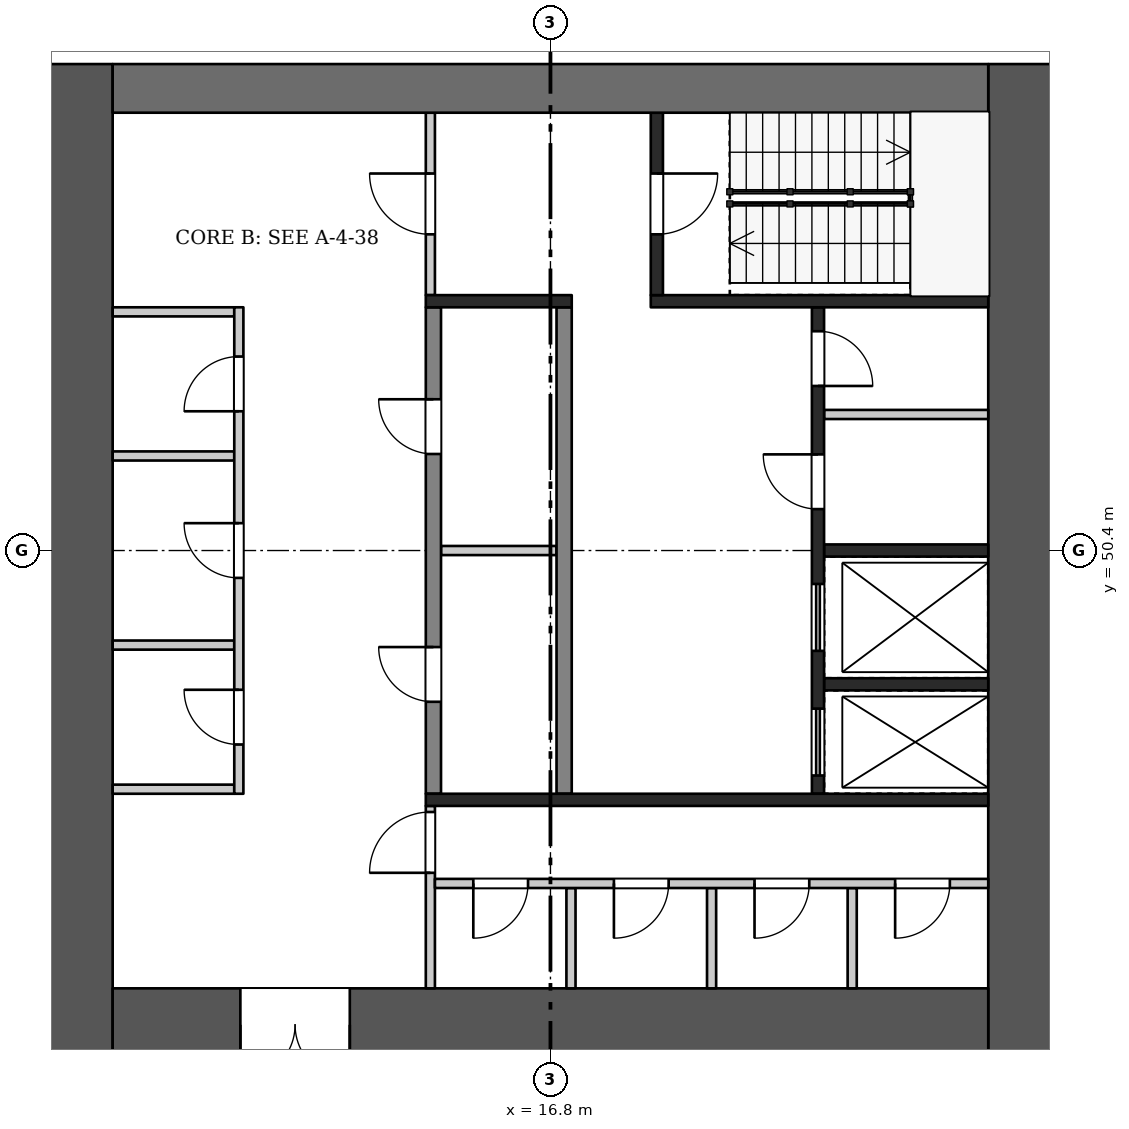
"""IFC4 building model, lengths in metres.
Left out: names, types, materials, properties, quantities, classifications, styles, units other than length and angle.
Written with IfcOpenShell. Run it as: python <this file> out.ifc"""

import sys

from ifc_helpers import new_model, si_unit, direction, frame, frame_2d, origin, place, context, subcontext, project, spatial, rectangle, extrude, element, fill, save


model = new_model("IFC4")
c1 = context("Model", 3, precision=1e-05, world=origin(), true_north=direction((0.0, 1.0)))
c2 = subcontext(c1, "Body", "Model", "MODEL_VIEW")
j1 = project(units=[si_unit("LENGTHUNIT", "METRE"), si_unit("PLANEANGLEUNIT", "RADIAN")], contexts=[c1])
p1 = place(None, origin())
s1 = spatial("IfcSite", under=j1, at=p1, CompositionType="ELEMENT")
p2 = place(p1, origin())
s2 = spatial("IfcBuilding", under=s1, at=p2, CompositionType="ELEMENT")
p3 = place(p2, frame((0.0, 0.0, -12.0)))
s3 = spatial("IfcBuildingStorey", under=s2, at=p3, CompositionType="ELEMENT", Elevation=-12.0)
for number, where, z_axis, x_axis in (
    (1, (9.0, 58.4, 0.0), (0.0, 0.0, 1.0), (0.0, -1.0, 0.0)),
    (2, (24.6, 58.4, 0.0), (0.0, 0.0, 1.0), (0.0, -1.0, 0.0)),
):
    element("IfcWall", number, at=place(p3, frame(where, z_axis=z_axis, x_axis=x_axis)), inside=s3, PredefinedType="SHEAR", context=c2, shape_type="SweptSolid", body=[
        extrude(rectangle(XDim=16.4, YDim=1.2, at=frame_2d((8.2, 0.0))), origin(), (0.0, 0.0, 1.0), 3.7),
    ])
p4 = place(p3, frame((9.6, 58.0, 0.0), z_axis=(0.0, 0.0, 1.0), x_axis=(1.0, 0.0, 0.0)))
e3 = element("IfcWall", 3, at=p4, inside=s3, PredefinedType="SHEAR", context=c2, shape_type="SweptSolid", body=[
    extrude(rectangle(XDim=14.4, YDim=0.8, at=frame_2d((7.2, 0.0))), origin(), (0.0, 0.0, 1.0), 3.7),
])
p5 = place(p3, frame((9.6, 42.6, 0.0), z_axis=(0.0, 0.0, 1.0), x_axis=(1.0, 0.0, 0.0)))
e4 = element("IfcWall", 4, at=p5, inside=s3, PredefinedType="SHEAR", context=c2, shape_type="SweptSolid", body=[
    extrude(rectangle(XDim=14.4, YDim=1.2, at=frame_2d((7.2, 0.0))), origin(), (0.0, 0.0, 1.0), 3.7),
])
p6 = place(p5, frame((2.1, 0.0, 0.0)))
e5 = element("IfcOpeningElement", 5, at=p6, cuts=e4, PredefinedType="OPENING", context=c2, shape_type="SweptSolid", body=[
    extrude(rectangle(XDim=1.8, YDim=2.1, at=frame_2d((0.9, 1.05))), frame((0.0, 0.61, 0.0), z_axis=(0.0, -1.0, 0.0), x_axis=(1.0, 0.0, 0.0)), (0.0, 0.0, 1.0), 1.22),
])
for number, where, z_axis, x_axis in (
    (6, (9.6, 54.325, 0.0), (0.0, 0.0, 1.0), (1.0, 0.0, 0.0)),
    (7, (9.6, 46.475, 0.0), (0.0, 0.0, 1.0), (1.0, 0.0, 0.0)),
    (8, (9.6, 51.955, 0.0), (0.0, 0.0, 1.0), (1.0, 0.0, 0.0)),
    (9, (9.6, 48.845, 0.0), (0.0, 0.0, 1.0), (1.0, 0.0, 0.0)),
):
    element("IfcWall", number, at=place(p3, frame(where, z_axis=z_axis, x_axis=x_axis)), inside=s3, PredefinedType="PARTITIONING", context=c2, shape_type="SweptSolid", body=[
        extrude(rectangle(XDim=2.0, YDim=0.15, at=frame_2d((1.0, 0.0))), origin(), (0.0, 0.0, 1.0), 3.7),
    ])
p7 = place(p3, frame((11.675, 54.4, 0.0), z_axis=(0.0, 0.0, 1.0), x_axis=(0.0, -1.0, 0.0)))
e10 = element("IfcWall", 10, at=p7, inside=s3, PredefinedType="PARTITIONING", context=c2, shape_type="SweptSolid", body=[
    extrude(rectangle(XDim=8.0, YDim=0.15, at=frame_2d((4.0, 0.0))), origin(), (0.0, 0.0, 1.0), 3.7),
])
p8 = place(p7, frame((0.81, 0.0, 0.0)))
e11 = element("IfcOpeningElement", 11, at=p8, cuts=e10, PredefinedType="OPENING", context=c2, shape_type="SweptSolid", body=[
    extrude(rectangle(XDim=0.9, YDim=2.1, at=frame_2d((0.45, 1.05))), frame((0.0, 0.085, 0.0), z_axis=(0.0, -1.0, 0.0), x_axis=(1.0, 0.0, 0.0)), (0.0, 0.0, 1.0), 0.17),
])
p9 = place(p7, frame((3.55, 0.0, 0.0)))
e12 = element("IfcOpeningElement", 12, at=p9, cuts=e10, PredefinedType="OPENING", context=c2, shape_type="SweptSolid", body=[
    extrude(rectangle(XDim=0.9, YDim=2.1, at=frame_2d((0.45, 1.05))), frame((0.0, 0.085, 0.0), z_axis=(0.0, -1.0, 0.0), x_axis=(1.0, 0.0, 0.0)), (0.0, 0.0, 1.0), 0.17),
])
p10 = place(p7, frame((6.29, 0.0, 0.0)))
e13 = element("IfcOpeningElement", 13, at=p10, cuts=e10, PredefinedType="OPENING", context=c2, shape_type="SweptSolid", body=[
    extrude(rectangle(XDim=0.9, YDim=2.1, at=frame_2d((0.45, 1.05))), frame((0.0, 0.085, 0.0), z_axis=(0.0, -1.0, 0.0), x_axis=(1.0, 0.0, 0.0)), (0.0, 0.0, 1.0), 0.17),
])
p11 = place(p3, frame((15.0, 50.4, 0.0), z_axis=(0.0, 0.0, 1.0), x_axis=(1.0, 0.0, 0.0)))
e14 = element("IfcWall", 14, at=p11, inside=s3, PredefinedType="PARTITIONING", context=c2, shape_type="SweptSolid", body=[
    extrude(rectangle(XDim=1.9, YDim=0.15, at=frame_2d((0.95, 0.0))), origin(), (0.0, 0.0, 1.0), 3.7),
])
p12 = place(p3, frame((14.875, 54.4, 0.0), z_axis=(0.0, 0.0, 1.0), x_axis=(0.0, -1.0, 0.0)))
e15 = element("IfcWall", 15, at=p12, inside=s3, PredefinedType="SHEAR", context=c2, shape_type="SweptSolid", body=[
    extrude(rectangle(XDim=8.0, YDim=0.25, at=frame_2d((4.0, 0.0))), origin(), (0.0, 0.0, 1.0), 3.7),
])
p13 = place(p12, frame((1.512, 0.0, 0.0)))
e16 = element("IfcOpeningElement", 16, at=p13, cuts=e15, PredefinedType="OPENING", context=c2, shape_type="SweptSolid", body=[
    extrude(rectangle(XDim=0.9, YDim=2.1, at=frame_2d((0.45, 1.05))), frame((0.0, 0.135, 0.0), z_axis=(0.0, -1.0, 0.0), x_axis=(1.0, 0.0, 0.0)), (0.0, 0.0, 1.0), 0.27),
])
p14 = place(p12, frame((5.587, 0.0, 0.0)))
e17 = element("IfcOpeningElement", 17, at=p14, cuts=e15, PredefinedType="OPENING", context=c2, shape_type="SweptSolid", body=[
    extrude(rectangle(XDim=0.9, YDim=2.1, at=frame_2d((0.45, 1.05))), frame((0.0, 0.135, 0.0), z_axis=(0.0, -1.0, 0.0), x_axis=(1.0, 0.0, 0.0)), (0.0, 0.0, 1.0), 0.27),
])
p15 = place(p3, frame((17.025, 54.4, 0.0), z_axis=(0.0, 0.0, 1.0), x_axis=(0.0, -1.0, 0.0)))
e18 = element("IfcWall", 18, at=p15, inside=s3, PredefinedType="SHEAR", context=c2, shape_type="SweptSolid", body=[
    extrude(rectangle(XDim=8.0, YDim=0.25, at=frame_2d((4.0, 0.0))), origin(), (0.0, 0.0, 1.0), 3.7),
])
for number, where, z_axis, x_axis in (
    (19, (21.3, 50.4, 0.0), (0.0, 0.0, 1.0), (1.0, 0.0, 0.0)),
    (20, (21.3, 48.2, 0.0), (0.0, 0.0, 1.0), (1.0, 0.0, 0.0)),
):
    element("IfcWall", number, at=place(p3, frame(where, z_axis=z_axis, x_axis=x_axis)), inside=s3, PredefinedType="SHEAR", context=c2, shape_type="SweptSolid", body=[
        extrude(rectangle(XDim=2.7, YDim=0.2, at=frame_2d((1.35, 0.0))), origin(), (0.0, 0.0, 1.0), 3.7),
    ])
p16 = place(p3, frame((21.3, 52.637, 0.0), z_axis=(0.0, 0.0, 1.0), x_axis=(1.0, 0.0, 0.0)))
e21 = element("IfcWall", 21, at=p16, inside=s3, PredefinedType="PARTITIONING", context=c2, shape_type="SweptSolid", body=[
    extrude(rectangle(XDim=2.7, YDim=0.15, at=frame_2d((1.35, 0.0))), origin(), (0.0, 0.0, 1.0), 3.7),
])
p17 = place(p3, frame((21.2, 54.4, 0.0), z_axis=(0.0, 0.0, 1.0), x_axis=(0.0, -1.0, 0.0)))
e22 = element("IfcWall", 22, at=p17, inside=s3, PredefinedType="SHEAR", context=c2, shape_type="SweptSolid", body=[
    extrude(rectangle(XDim=8.0, YDim=0.2, at=frame_2d((4.0, 0.0))), origin(), (0.0, 0.0, 1.0), 3.7),
])
p18 = place(p17, frame((0.394, 0.0, 0.0)))
e23 = element("IfcOpeningElement", 23, at=p18, cuts=e22, PredefinedType="OPENING", context=c2, shape_type="SweptSolid", body=[
    extrude(rectangle(XDim=0.9, YDim=2.1, at=frame_2d((0.45, 1.05))), frame((0.0, 0.11, 0.0), z_axis=(0.0, -1.0, 0.0), x_axis=(1.0, 0.0, 0.0)), (0.0, 0.0, 1.0), 0.22),
])
p19 = place(p17, frame((2.419, 0.0, 0.0)))
e24 = element("IfcOpeningElement", 24, at=p19, cuts=e22, PredefinedType="OPENING", context=c2, shape_type="SweptSolid", body=[
    extrude(rectangle(XDim=0.9, YDim=2.1, at=frame_2d((0.45, 1.05))), frame((0.0, 0.11, 0.0), z_axis=(0.0, -1.0, 0.0), x_axis=(1.0, 0.0, 0.0)), (0.0, 0.0, 1.0), 0.22),
])
p20 = place(p17, frame((4.55, 0.0, 0.0)))
e25 = element("IfcOpeningElement", 25, at=p20, cuts=e22, PredefinedType="OPENING", context=c2, shape_type="SweptSolid", body=[
    extrude(rectangle(XDim=1.1, YDim=2.1, at=frame_2d((0.55, 1.05))), frame((0.0, 0.11, 0.0), z_axis=(0.0, -1.0, 0.0), x_axis=(1.0, 0.0, 0.0)), (0.0, 0.0, 1.0), 0.22),
])
p21 = place(p17, frame((6.6, 0.0, 0.0)))
e26 = element("IfcOpeningElement", 26, at=p21, cuts=e22, PredefinedType="OPENING", context=c2, shape_type="SweptSolid", body=[
    extrude(rectangle(XDim=1.1, YDim=2.1, at=frame_2d((0.55, 1.05))), frame((0.0, 0.11, 0.0), z_axis=(0.0, -1.0, 0.0), x_axis=(1.0, 0.0, 0.0)), (0.0, 0.0, 1.0), 0.22),
])
p22 = place(p3, frame((14.75, 54.5, 0.0), z_axis=(0.0, 0.0, 1.0), x_axis=(1.0, 0.0, 0.0)))
e27 = element("IfcWall", 27, at=p22, inside=s3, PredefinedType="SHEAR", context=c2, shape_type="SweptSolid", body=[
    extrude(rectangle(XDim=2.4, YDim=0.2, at=frame_2d((1.2, 0.0))), origin(), (0.0, 0.0, 1.0), 3.7),
])
p23 = place(p3, frame((18.45, 54.5, 0.0), z_axis=(0.0, 0.0, 1.0), x_axis=(1.0, 0.0, 0.0)))
e28 = element("IfcWall", 28, at=p23, inside=s3, PredefinedType="SHEAR", context=c2, shape_type="SweptSolid", body=[
    extrude(rectangle(XDim=5.55, YDim=0.2, at=frame_2d((2.775, 0.0))), origin(), (0.0, 0.0, 1.0), 3.7),
])
p24 = place(p3, frame((14.825, 57.6, 0.0), z_axis=(0.0, 0.0, 1.0), x_axis=(0.0, -1.0, 0.0)))
e29 = element("IfcWall", 29, at=p24, inside=s3, PredefinedType="PARTITIONING", context=c2, shape_type="SweptSolid", body=[
    extrude(rectangle(XDim=3.0, YDim=0.15, at=frame_2d((1.5, 0.0))), origin(), (0.0, 0.0, 1.0), 3.7),
])
p25 = place(p24, frame((1.0, 0.0, 0.0)))
e30 = element("IfcOpeningElement", 30, at=p25, cuts=e29, PredefinedType="OPENING", context=c2, shape_type="SweptSolid", body=[
    extrude(rectangle(XDim=1.0, YDim=2.1, at=frame_2d((0.5, 1.05))), frame((0.0, 0.085, 0.0), z_axis=(0.0, -1.0, 0.0), x_axis=(1.0, 0.0, 0.0)), (0.0, 0.0, 1.0), 0.17),
])
p26 = place(p3, frame((18.55, 57.6, 0.0), z_axis=(0.0, 0.0, 1.0), x_axis=(0.0, -1.0, 0.0)))
e31 = element("IfcWall", 31, at=p26, inside=s3, PredefinedType="SHEAR", context=c2, shape_type="SweptSolid", body=[
    extrude(rectangle(XDim=3.0, YDim=0.2, at=frame_2d((1.5, 0.0))), origin(), (0.0, 0.0, 1.0), 3.7),
])
p27 = place(p26, frame((1.0, 0.0, 0.0)))
e32 = element("IfcOpeningElement", 32, at=p27, cuts=e31, PredefinedType="OPENING", context=c2, shape_type="SweptSolid", body=[
    extrude(rectangle(XDim=1.0, YDim=2.1, at=frame_2d((0.5, 1.05))), frame((0.0, 0.11, 0.0), z_axis=(0.0, -1.0, 0.0), x_axis=(1.0, 0.0, 0.0)), (0.0, 0.0, 1.0), 0.22),
])
p28 = place(p3, frame((14.75, 46.3, 0.0), z_axis=(0.0, 0.0, 1.0), x_axis=(1.0, 0.0, 0.0)))
e33 = element("IfcWall", 33, at=p28, inside=s3, PredefinedType="SHEAR", context=c2, shape_type="SweptSolid", body=[
    extrude(rectangle(XDim=9.25, YDim=0.2, at=frame_2d((4.625, 0.0))), origin(), (0.0, 0.0, 1.0), 3.7),
])
p29 = place(p3, frame((14.825, 46.2, 0.0), z_axis=(0.0, 0.0, 1.0), x_axis=(0.0, -1.0, 0.0)))
e34 = element("IfcWall", 34, at=p29, inside=s3, PredefinedType="PARTITIONING", context=c2, shape_type="SweptSolid", body=[
    extrude(rectangle(XDim=3.0, YDim=0.15, at=frame_2d((1.5, 0.0))), origin(), (0.0, 0.0, 1.0), 3.7),
])
p30 = place(p29, frame((0.1, 0.0, 0.0)))
e35 = element("IfcOpeningElement", 35, at=p30, cuts=e34, PredefinedType="OPENING", context=c2, shape_type="SweptSolid", body=[
    extrude(rectangle(XDim=1.0, YDim=2.1, at=frame_2d((0.5, 1.05))), frame((0.0, 0.085, 0.0), z_axis=(0.0, -1.0, 0.0), x_axis=(1.0, 0.0, 0.0)), (0.0, 0.0, 1.0), 0.17),
])
for number, where, z_axis, x_axis in (
    (36, (17.137, 44.85, 0.0), (0.0, 0.0, 1.0), (0.0, -1.0, 0.0)),
    (37, (19.45, 44.85, 0.0), (0.0, 0.0, 1.0), (0.0, -1.0, 0.0)),
    (38, (21.762, 44.85, 0.0), (0.0, 0.0, 1.0), (0.0, -1.0, 0.0)),
):
    element("IfcWall", number, at=place(p3, frame(where, z_axis=z_axis, x_axis=x_axis)), inside=s3, PredefinedType="PARTITIONING", context=c2, shape_type="SweptSolid", body=[
        extrude(rectangle(XDim=1.65, YDim=0.15, at=frame_2d((0.825, 0.0))), origin(), (0.0, 0.0, 1.0), 3.7),
    ])
p31 = place(p3, frame((14.9, 44.925, 0.0), z_axis=(0.0, 0.0, 1.0), x_axis=(1.0, 0.0, 0.0)))
e39 = element("IfcWall", 39, at=p31, inside=s3, PredefinedType="PARTITIONING", context=c2, shape_type="SweptSolid", body=[
    extrude(rectangle(XDim=9.1, YDim=0.15, at=frame_2d((4.55, 0.0))), origin(), (0.0, 0.0, 1.0), 3.7),
])
p32 = place(p31, frame((0.631, 0.0, 0.0)))
e40 = element("IfcOpeningElement", 40, at=p32, cuts=e39, PredefinedType="OPENING", context=c2, shape_type="SweptSolid", body=[
    extrude(rectangle(XDim=0.9, YDim=2.1, at=frame_2d((0.45, 1.05))), frame((0.0, 0.085, 0.0), z_axis=(0.0, -1.0, 0.0), x_axis=(1.0, 0.0, 0.0)), (0.0, 0.0, 1.0), 0.17),
])
p33 = place(p31, frame((2.944, 0.0, 0.0)))
e41 = element("IfcOpeningElement", 41, at=p33, cuts=e39, PredefinedType="OPENING", context=c2, shape_type="SweptSolid", body=[
    extrude(rectangle(XDim=0.9, YDim=2.1, at=frame_2d((0.45, 1.05))), frame((0.0, 0.085, 0.0), z_axis=(0.0, -1.0, 0.0), x_axis=(1.0, 0.0, 0.0)), (0.0, 0.0, 1.0), 0.17),
])
p34 = place(p31, frame((5.256, 0.0, 0.0)))
e42 = element("IfcOpeningElement", 42, at=p34, cuts=e39, PredefinedType="OPENING", context=c2, shape_type="SweptSolid", body=[
    extrude(rectangle(XDim=0.9, YDim=2.1, at=frame_2d((0.45, 1.05))), frame((0.0, 0.085, 0.0), z_axis=(0.0, -1.0, 0.0), x_axis=(1.0, 0.0, 0.0)), (0.0, 0.0, 1.0), 0.17),
])
p35 = place(p31, frame((7.569, 0.0, 0.0)))
e43 = element("IfcOpeningElement", 43, at=p35, cuts=e39, PredefinedType="OPENING", context=c2, shape_type="SweptSolid", body=[
    extrude(rectangle(XDim=0.9, YDim=2.1, at=frame_2d((0.45, 1.05))), frame((0.0, 0.085, 0.0), z_axis=(0.0, -1.0, 0.0), x_axis=(1.0, 0.0, 0.0)), (0.0, 0.0, 1.0), 0.17),
])
p36 = place(p6, frame((1.8, 0.0, 0.0), z_axis=(0.0, 0.0, 1.0), x_axis=(-1.0, 0.0, 0.0)))
e44 = element("IfcDoor", 44, at=p36, inside=s3, OperationType="DOUBLE_DOOR_SINGLE_SWING", PredefinedType="DOOR", context=c2, shape_type="SweptSolid", body=[
    extrude(rectangle(XDim=1.8, YDim=2.1, at=frame_2d((0.9, 1.05))), frame((0.0, 0.025, 0.0), z_axis=(0.0, -1.0, 0.0), x_axis=(1.0, 0.0, 0.0)), (0.0, 0.0, 1.0), 0.05),
])
fill(e5, e44)
p37 = place(p8, frame((0.9, 0.0, 0.0), z_axis=(0.0, 0.0, 1.0), x_axis=(-1.0, 0.0, 0.0)))
e45 = element("IfcDoor", 45, at=p37, inside=s3, OperationType="SINGLE_SWING_LEFT", PredefinedType="DOOR", context=c2, shape_type="SweptSolid", body=[
    extrude(rectangle(XDim=0.9, YDim=2.1, at=frame_2d((0.45, 1.05))), frame((0.0, 0.025, 0.0), z_axis=(0.0, -1.0, 0.0), x_axis=(1.0, 0.0, 0.0)), (0.0, 0.0, 1.0), 0.05),
])
fill(e11, e45)
p38 = place(p9, frame((0.9, 0.0, 0.0), z_axis=(0.0, 0.0, 1.0), x_axis=(-1.0, 0.0, 0.0)))
e46 = element("IfcDoor", 46, at=p38, inside=s3, OperationType="SINGLE_SWING_RIGHT", PredefinedType="DOOR", context=c2, shape_type="SweptSolid", body=[
    extrude(rectangle(XDim=0.9, YDim=2.1, at=frame_2d((0.45, 1.05))), frame((0.0, 0.025, 0.0), z_axis=(0.0, -1.0, 0.0), x_axis=(1.0, 0.0, 0.0)), (0.0, 0.0, 1.0), 0.05),
])
fill(e12, e46)
p39 = place(p10, frame((0.9, 0.0, 0.0), z_axis=(0.0, 0.0, 1.0), x_axis=(-1.0, 0.0, 0.0)))
e47 = element("IfcDoor", 47, at=p39, inside=s3, OperationType="SINGLE_SWING_RIGHT", PredefinedType="DOOR", context=c2, shape_type="SweptSolid", body=[
    extrude(rectangle(XDim=0.9, YDim=2.1, at=frame_2d((0.45, 1.05))), frame((0.0, 0.025, 0.0), z_axis=(0.0, -1.0, 0.0), x_axis=(1.0, 0.0, 0.0)), (0.0, 0.0, 1.0), 0.05),
])
fill(e13, e47)
p40 = place(p13, frame((0.9, 0.0, 0.0), z_axis=(0.0, 0.0, 1.0), x_axis=(-1.0, 0.0, 0.0)))
e48 = element("IfcDoor", 48, at=p40, inside=s3, OperationType="SINGLE_SWING_RIGHT", PredefinedType="DOOR", context=c2, shape_type="SweptSolid", body=[
    extrude(rectangle(XDim=0.9, YDim=2.1, at=frame_2d((0.45, 1.05))), frame((0.0, 0.025, 0.0), z_axis=(0.0, -1.0, 0.0), x_axis=(1.0, 0.0, 0.0)), (0.0, 0.0, 1.0), 0.05),
])
fill(e16, e48)
p41 = place(p14, frame((0.9, 0.0, 0.0), z_axis=(0.0, 0.0, 1.0), x_axis=(-1.0, 0.0, 0.0)))
e49 = element("IfcDoor", 49, at=p41, inside=s3, OperationType="SINGLE_SWING_RIGHT", PredefinedType="DOOR", context=c2, shape_type="SweptSolid", body=[
    extrude(rectangle(XDim=0.9, YDim=2.1, at=frame_2d((0.45, 1.05))), frame((0.0, 0.025, 0.0), z_axis=(0.0, -1.0, 0.0), x_axis=(1.0, 0.0, 0.0)), (0.0, 0.0, 1.0), 0.05),
])
fill(e17, e49)
p42 = place(p18, origin())
e50 = element("IfcDoor", 50, at=p42, inside=s3, OperationType="SINGLE_SWING_RIGHT", PredefinedType="DOOR", context=c2, shape_type="SweptSolid", body=[
    extrude(rectangle(XDim=0.9, YDim=2.1, at=frame_2d((0.45, 1.05))), frame((0.0, 0.025, 0.0), z_axis=(0.0, -1.0, 0.0), x_axis=(1.0, 0.0, 0.0)), (0.0, 0.0, 1.0), 0.05),
])
fill(e23, e50)
p43 = place(p19, frame((0.9, 0.0, 0.0), z_axis=(0.0, 0.0, 1.0), x_axis=(-1.0, 0.0, 0.0)))
e51 = element("IfcDoor", 51, at=p43, inside=s3, OperationType="SINGLE_SWING_RIGHT", PredefinedType="DOOR", context=c2, shape_type="SweptSolid", body=[
    extrude(rectangle(XDim=0.9, YDim=2.1, at=frame_2d((0.45, 1.05))), frame((0.0, 0.025, 0.0), z_axis=(0.0, -1.0, 0.0), x_axis=(1.0, 0.0, 0.0)), (0.0, 0.0, 1.0), 0.05),
])
fill(e24, e51)
p44 = place(p20, origin())
e52 = element("IfcDoor", 52, at=p44, inside=s3, OperationType="DOUBLE_DOOR_SLIDING", PredefinedType="DOOR", context=c2, shape_type="SweptSolid", body=[
    extrude(rectangle(XDim=1.1, YDim=2.1, at=frame_2d((0.55, 1.05))), frame((0.0, 0.025, 0.0), z_axis=(0.0, -1.0, 0.0), x_axis=(1.0, 0.0, 0.0)), (0.0, 0.0, 1.0), 0.05),
])
fill(e25, e52)
p45 = place(p21, origin())
e53 = element("IfcDoor", 53, at=p45, inside=s3, OperationType="DOUBLE_DOOR_SLIDING", PredefinedType="DOOR", context=c2, shape_type="SweptSolid", body=[
    extrude(rectangle(XDim=1.1, YDim=2.1, at=frame_2d((0.55, 1.05))), frame((0.0, 0.025, 0.0), z_axis=(0.0, -1.0, 0.0), x_axis=(1.0, 0.0, 0.0)), (0.0, 0.0, 1.0), 0.05),
])
fill(e26, e53)
p46 = place(p25, frame((1.0, 0.0, 0.0), z_axis=(0.0, 0.0, 1.0), x_axis=(-1.0, 0.0, 0.0)))
e54 = element("IfcDoor", 54, at=p46, inside=s3, OperationType="SINGLE_SWING_RIGHT", PredefinedType="DOOR", context=c2, shape_type="SweptSolid", body=[
    extrude(rectangle(XDim=1.0, YDim=2.1, at=frame_2d((0.5, 1.05))), frame((0.0, 0.025, 0.0), z_axis=(0.0, -1.0, 0.0), x_axis=(1.0, 0.0, 0.0)), (0.0, 0.0, 1.0), 0.05),
])
fill(e30, e54)
p47 = place(p27, origin())
e55 = element("IfcDoor", 55, at=p47, inside=s3, OperationType="SINGLE_SWING_LEFT", PredefinedType="DOOR", context=c2, shape_type="SweptSolid", body=[
    extrude(rectangle(XDim=1.0, YDim=2.1, at=frame_2d((0.5, 1.05))), frame((0.0, 0.025, 0.0), z_axis=(0.0, -1.0, 0.0), x_axis=(1.0, 0.0, 0.0)), (0.0, 0.0, 1.0), 0.05),
])
fill(e32, e55)
p48 = place(p30, frame((1.0, 0.0, 0.0), z_axis=(0.0, 0.0, 1.0), x_axis=(-1.0, 0.0, 0.0)))
e56 = element("IfcDoor", 56, at=p48, inside=s3, OperationType="SINGLE_SWING_LEFT", PredefinedType="DOOR", context=c2, shape_type="SweptSolid", body=[
    extrude(rectangle(XDim=1.0, YDim=2.1, at=frame_2d((0.5, 1.05))), frame((0.0, 0.025, 0.0), z_axis=(0.0, -1.0, 0.0), x_axis=(1.0, 0.0, 0.0)), (0.0, 0.0, 1.0), 0.05),
])
fill(e35, e56)
p49 = place(p32, frame((0.9, 0.0, 0.0), z_axis=(0.0, 0.0, 1.0), x_axis=(-1.0, 0.0, 0.0)))
e57 = element("IfcDoor", 57, at=p49, inside=s3, OperationType="SINGLE_SWING_RIGHT", PredefinedType="DOOR", context=c2, shape_type="SweptSolid", body=[
    extrude(rectangle(XDim=0.9, YDim=2.1, at=frame_2d((0.45, 1.05))), frame((0.0, 0.025, 0.0), z_axis=(0.0, -1.0, 0.0), x_axis=(1.0, 0.0, 0.0)), (0.0, 0.0, 1.0), 0.05),
])
fill(e40, e57)
p50 = place(p33, frame((0.9, 0.0, 0.0), z_axis=(0.0, 0.0, 1.0), x_axis=(-1.0, 0.0, 0.0)))
e58 = element("IfcDoor", 58, at=p50, inside=s3, OperationType="SINGLE_SWING_RIGHT", PredefinedType="DOOR", context=c2, shape_type="SweptSolid", body=[
    extrude(rectangle(XDim=0.9, YDim=2.1, at=frame_2d((0.45, 1.05))), frame((0.0, 0.025, 0.0), z_axis=(0.0, -1.0, 0.0), x_axis=(1.0, 0.0, 0.0)), (0.0, 0.0, 1.0), 0.05),
])
fill(e41, e58)
p51 = place(p34, frame((0.9, 0.0, 0.0), z_axis=(0.0, 0.0, 1.0), x_axis=(-1.0, 0.0, 0.0)))
e59 = element("IfcDoor", 59, at=p51, inside=s3, OperationType="SINGLE_SWING_RIGHT", PredefinedType="DOOR", context=c2, shape_type="SweptSolid", body=[
    extrude(rectangle(XDim=0.9, YDim=2.1, at=frame_2d((0.45, 1.05))), frame((0.0, 0.025, 0.0), z_axis=(0.0, -1.0, 0.0), x_axis=(1.0, 0.0, 0.0)), (0.0, 0.0, 1.0), 0.05),
])
fill(e42, e59)
p52 = place(p35, frame((0.9, 0.0, 0.0), z_axis=(0.0, 0.0, 1.0), x_axis=(-1.0, 0.0, 0.0)))
e60 = element("IfcDoor", 60, at=p52, inside=s3, OperationType="SINGLE_SWING_RIGHT", PredefinedType="DOOR", context=c2, shape_type="SweptSolid", body=[
    extrude(rectangle(XDim=0.9, YDim=2.1, at=frame_2d((0.45, 1.05))), frame((0.0, 0.025, 0.0), z_axis=(0.0, -1.0, 0.0), x_axis=(1.0, 0.0, 0.0)), (0.0, 0.0, 1.0), 0.05),
])
fill(e43, e60)
save(model, sys.argv[1])
